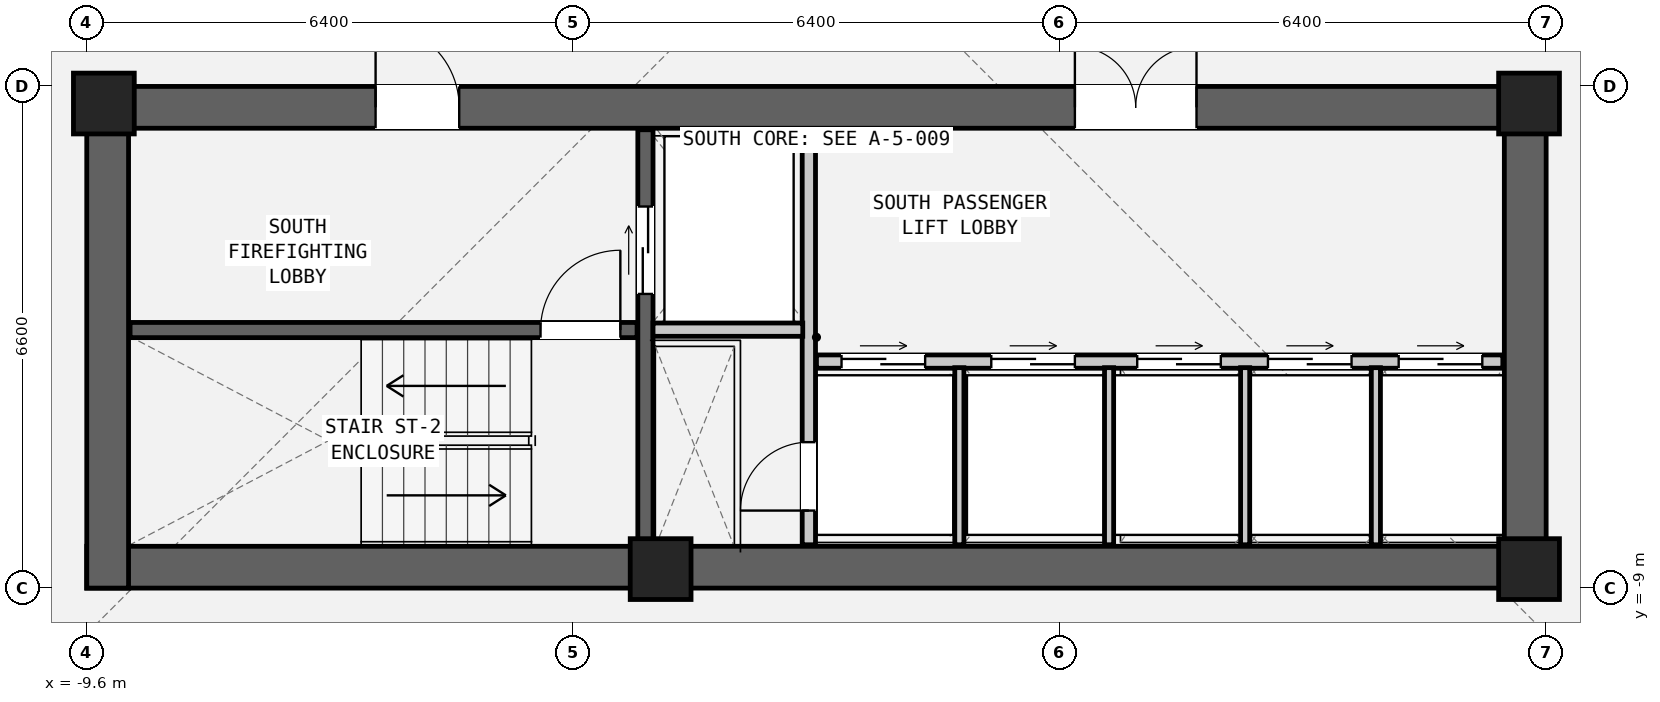
"""IFC4 building model, lengths in metres.
Left out: names, types, materials, properties, quantities, classifications, styles, units other than length and angle.
Written with IfcOpenShell. Run it as: python <this file> out.ifc"""

import sys

from ifc_helpers import new_model, si_unit, direction, frame, frame_2d, origin, origin_2d, place, context, subcontext, project, spatial, rectangle, extrude, element, fill, save


model = new_model("IFC4")
c1 = context("Model", 3, precision=1e-05, world=origin(), true_north=direction((0.0, 1.0)))
c2 = subcontext(c1, "Body", "Model", "MODEL_VIEW")
j1 = project(units=[si_unit("LENGTHUNIT", "METRE"), si_unit("PLANEANGLEUNIT", "RADIAN")], contexts=[c1])
p1 = place(None, origin())
s1 = spatial("IfcSite", under=j1, at=p1, CompositionType="ELEMENT")
p2 = place(p1, origin())
s2 = spatial("IfcBuilding", under=s1, at=p2, CompositionType="ELEMENT")
p3 = place(p2, frame((0.0, 0.0, 26.1)))
s3 = spatial("IfcBuildingStorey", under=s2, at=p3, CompositionType="ELEMENT", Elevation=26.1)
p4 = place(p3, frame((-9.6, -8.725, 0.0), z_axis=(0.0, 0.0, 1.0), x_axis=(1.0, 0.0, 0.0)))
e1 = element("IfcWall", 1, at=p4, inside=s3, PredefinedType="SHEAR", context=c2, shape_type="SweptSolid", body=[
    extrude(rectangle(XDim=19.2, YDim=0.55, at=frame_2d((9.6, 0.0))), origin(), (0.0, 0.0, 1.0), 3.05),
])
p5 = place(p3, frame((-9.6, -2.675, 0.0), z_axis=(0.0, 0.0, 1.0), x_axis=(1.0, 0.0, 0.0)))
e2 = element("IfcWall", 2, at=p5, inside=s3, PredefinedType="SHEAR", context=c2, shape_type="SweptSolid", body=[
    extrude(rectangle(XDim=19.2, YDim=0.55, at=frame_2d((9.6, 0.0))), origin(), (0.0, 0.0, 1.0), 3.05),
])
p6 = place(p5, frame((3.8, 0.0, 0.0)))
e3 = element("IfcOpeningElement", 3, at=p6, cuts=e2, PredefinedType="OPENING", context=c2, shape_type="SweptSolid", body=[
    extrude(rectangle(XDim=1.1, YDim=2.08, at=frame_2d((0.55, 1.04))), frame((0.0, 0.287, 0.0), z_axis=(0.0, -1.0, 0.0), x_axis=(1.0, 0.0, 0.0)), (0.0, 0.0, 1.0), 0.574),
])
p7 = place(p5, frame((13.0, 0.0, 0.0)))
e4 = element("IfcOpeningElement", 4, at=p7, cuts=e2, PredefinedType="OPENING", context=c2, shape_type="SweptSolid", body=[
    extrude(rectangle(XDim=1.6, YDim=2.12, at=frame_2d((0.8, 1.06))), frame((0.0, 0.287, 0.0), z_axis=(0.0, -1.0, 0.0), x_axis=(1.0, 0.0, 0.0)), (0.0, 0.0, 1.0), 0.574),
])
for number, where, z_axis, x_axis in (
    (5, (-9.325, -9.0, 0.0), (0.0, 0.0, 1.0), (0.0, 1.0, 0.0)),
    (6, (9.325, -9.0, 0.0), (0.0, 0.0, 1.0), (0.0, 1.0, 0.0)),
):
    element("IfcWall", number, at=place(p3, frame(where, z_axis=z_axis, x_axis=x_axis)), inside=s3, PredefinedType="SHEAR", context=c2, shape_type="SweptSolid", body=[
        extrude(rectangle(XDim=6.6, YDim=0.55, at=frame_2d((3.3, 0.0))), origin(), (0.0, 0.0, 1.0), 3.05),
    ])
for number, where, z_axis, x_axis in (
    (7, (-9.375, -2.625, 0.0), (0.0, 0.0, 1.0), (1.0, 0.0, 0.0)),
    (8, (9.375, -2.625, 0.0), (0.0, 0.0, 1.0), (1.0, 0.0, 0.0)),
    (9, (-2.05, -8.75, 0.0), (0.0, 0.0, 1.0), (1.0, 0.0, 0.0)),
    (10, (9.375, -8.75, 0.0), (0.0, 0.0, 1.0), (1.0, 0.0, 0.0)),
):
    element("IfcColumn", number, at=place(p3, frame(where, z_axis=z_axis, x_axis=x_axis)), inside=s3, PredefinedType="COLUMN", context=c2, shape_type="SweptSolid", body=[
        extrude(rectangle(XDim=0.8, YDim=0.8, at=origin_2d()), origin(), (0.0, 0.0, 1.0), 3.05),
    ])
p8 = place(p3, frame((-9.03, -5.605, 0.0), z_axis=(0.0, 0.0, 1.0), x_axis=(1.0, 0.0, 0.0)))
e11 = element("IfcWall", 11, at=p8, inside=s3, PredefinedType="SHEAR", context=c2, shape_type="SweptSolid", body=[
    extrude(rectangle(XDim=6.67, YDim=0.2, at=frame_2d((3.335, 0.0))), origin(), (0.0, 0.0, 1.0), 2.83),
])
p9 = place(p8, frame((5.4, 0.0, 0.0)))
e12 = element("IfcOpeningElement", 12, at=p9, cuts=e11, PredefinedType="OPENING", context=c2, shape_type="SweptSolid", body=[
    extrude(rectangle(XDim=1.05, YDim=2.08, at=frame_2d((0.525, 1.04))), frame((0.0, 0.112, 0.0), z_axis=(0.0, -1.0, 0.0), x_axis=(1.0, 0.0, 0.0)), (0.0, 0.0, 1.0), 0.224),
])
p10 = place(p3, frame((-2.25, -8.43, 0.0), z_axis=(0.0, 0.0, 1.0), x_axis=(0.0, 1.0, 0.0)))
e13 = element("IfcWall", 13, at=p10, inside=s3, PredefinedType="SHEAR", context=c2, shape_type="SweptSolid", body=[
    extrude(rectangle(XDim=5.46, YDim=0.2, at=frame_2d((2.73, 0.0))), origin(), (0.0, 0.0, 1.0), 2.83),
])
p11 = place(p10, frame((3.3, 0.0, 0.0)))
e14 = element("IfcOpeningElement", 14, at=p11, cuts=e13, PredefinedType="OPENING", context=c2, shape_type="SweptSolid", body=[
    extrude(rectangle(XDim=1.15, YDim=2.08, at=frame_2d((0.575, 1.04))), frame((0.0, 0.112, 0.0), z_axis=(0.0, -1.0, 0.0), x_axis=(1.0, 0.0, 0.0)), (0.0, 0.0, 1.0), 0.224),
])
p12 = place(p3, frame((-0.1, -8.43, 0.0), z_axis=(0.0, 0.0, 1.0), x_axis=(0.0, 1.0, 0.0)))
e15 = element("IfcWall", 15, at=p12, inside=s3, PredefinedType="PARTITIONING", context=c2, shape_type="SweptSolid", body=[
    extrude(rectangle(XDim=5.46, YDim=0.175, at=frame_2d((2.73, 0.0))), origin(), (0.0, 0.0, 1.0), 2.83),
])
p13 = place(p12, frame((0.45, 0.0, 0.0)))
e16 = element("IfcOpeningElement", 16, at=p13, cuts=e15, PredefinedType="OPENING", context=c2, shape_type="SweptSolid", body=[
    extrude(rectangle(XDim=0.9, YDim=2.05, at=frame_2d((0.45, 1.025))), frame((0.0, 0.1, 0.0), z_axis=(0.0, -1.0, 0.0), x_axis=(1.0, 0.0, 0.0)), (0.0, 0.0, 1.0), 0.199),
])
p14 = place(p3, frame((-2.15, -5.6, 0.0), z_axis=(0.0, 0.0, 1.0), x_axis=(1.0, 0.0, 0.0)))
e17 = element("IfcWall", 17, at=p14, inside=s3, PredefinedType="PARTITIONING", context=c2, shape_type="SweptSolid", body=[
    extrude(rectangle(XDim=1.97, YDim=0.175, at=frame_2d((0.985, 0.0))), origin(), (0.0, 0.0, 1.0), 2.83),
])
p15 = place(p3, frame((0.0, -6.02, 0.0), z_axis=(0.0, 0.0, 1.0), x_axis=(1.0, 0.0, 0.0)))
e18 = element("IfcWall", 18, at=p15, inside=s3, PredefinedType="PARTITIONING", context=c2, shape_type="SweptSolid", body=[
    extrude(rectangle(XDim=9.03, YDim=0.175, at=frame_2d((4.515, 0.0))), origin(), (0.0, 0.0, 1.0), 2.83),
])
p16 = place(p15, frame((0.33, 0.0, 0.0)))
e19 = element("IfcOpeningElement", 19, at=p16, cuts=e18, PredefinedType="OPENING", context=c2, shape_type="SweptSolid", body=[
    extrude(rectangle(XDim=1.1, YDim=2.06, at=frame_2d((0.55, 1.03))), frame((0.0, 0.1, 0.0), z_axis=(0.0, -1.0, 0.0), x_axis=(1.0, 0.0, 0.0)), (0.0, 0.0, 1.0), 0.199),
])
p17 = place(p15, frame((2.3, 0.0, 0.0)))
e20 = element("IfcOpeningElement", 20, at=p17, cuts=e18, PredefinedType="OPENING", context=c2, shape_type="SweptSolid", body=[
    extrude(rectangle(XDim=1.1, YDim=2.06, at=frame_2d((0.55, 1.03))), frame((0.0, 0.1, 0.0), z_axis=(0.0, -1.0, 0.0), x_axis=(1.0, 0.0, 0.0)), (0.0, 0.0, 1.0), 0.199),
])
p18 = place(p15, frame((4.22, 0.0, 0.0)))
e21 = element("IfcOpeningElement", 21, at=p18, cuts=e18, PredefinedType="OPENING", context=c2, shape_type="SweptSolid", body=[
    extrude(rectangle(XDim=1.1, YDim=2.06, at=frame_2d((0.55, 1.03))), frame((0.0, 0.1, 0.0), z_axis=(0.0, -1.0, 0.0), x_axis=(1.0, 0.0, 0.0)), (0.0, 0.0, 1.0), 0.199),
])
p19 = place(p15, frame((5.94, 0.0, 0.0)))
e22 = element("IfcOpeningElement", 22, at=p19, cuts=e18, PredefinedType="OPENING", context=c2, shape_type="SweptSolid", body=[
    extrude(rectangle(XDim=1.1, YDim=2.06, at=frame_2d((0.55, 1.03))), frame((0.0, 0.1, 0.0), z_axis=(0.0, -1.0, 0.0), x_axis=(1.0, 0.0, 0.0)), (0.0, 0.0, 1.0), 0.199),
])
p20 = place(p15, frame((7.66, 0.0, 0.0)))
e23 = element("IfcOpeningElement", 23, at=p20, cuts=e18, PredefinedType="OPENING", context=c2, shape_type="SweptSolid", body=[
    extrude(rectangle(XDim=1.1, YDim=2.06, at=frame_2d((0.55, 1.03))), frame((0.0, 0.1, 0.0), z_axis=(0.0, -1.0, 0.0), x_axis=(1.0, 0.0, 0.0)), (0.0, 0.0, 1.0), 0.199),
])
for number, where, z_axis, x_axis in (
    (24, (1.88, -8.43, 0.0), (0.0, 0.0, 1.0), (0.0, 1.0, 0.0)),
    (25, (3.85, -8.43, 0.0), (0.0, 0.0, 1.0), (0.0, 1.0, 0.0)),
    (26, (5.64, -8.43, 0.0), (0.0, 0.0, 1.0), (0.0, 1.0, 0.0)),
    (27, (7.36, -8.43, 0.0), (0.0, 0.0, 1.0), (0.0, 1.0, 0.0)),
):
    element("IfcWall", number, at=place(p3, frame(where, z_axis=z_axis, x_axis=x_axis)), inside=s3, PredefinedType="PARTITIONING", context=c2, shape_type="SweptSolid", body=[
        extrude(rectangle(XDim=2.33, YDim=0.12, at=frame_2d((1.165, 0.0))), origin(), (0.0, 0.0, 1.0), 2.83),
    ])
p21 = place(p9, origin())
e28 = element("IfcDoor", 28, at=p21, inside=s3, OperationType="SINGLE_SWING_RIGHT", PredefinedType="DOOR", context=c2, shape_type="SweptSolid", body=[
    extrude(rectangle(XDim=1.05, YDim=2.08, at=frame_2d((0.525, 1.04))), frame((0.0, 0.025, 0.0), z_axis=(0.0, -1.0, 0.0), x_axis=(1.0, 0.0, 0.0)), (0.0, 0.0, 1.0), 0.05),
])
fill(e12, e28)
p22 = place(p6, origin())
e29 = element("IfcDoor", 29, at=p22, inside=s3, OperationType="SINGLE_SWING_LEFT", PredefinedType="DOOR", context=c2, shape_type="SweptSolid", body=[
    extrude(rectangle(XDim=1.1, YDim=2.08, at=frame_2d((0.55, 1.04))), frame((0.0, 0.025, 0.0), z_axis=(0.0, -1.0, 0.0), x_axis=(1.0, 0.0, 0.0)), (0.0, 0.0, 1.0), 0.05),
])
fill(e3, e29)
p23 = place(p11, origin())
e30 = element("IfcDoor", 30, at=p23, inside=s3, OperationType="DOUBLE_DOOR_SLIDING", PredefinedType="DOOR", context=c2, shape_type="SweptSolid", body=[
    extrude(rectangle(XDim=1.15, YDim=2.08, at=frame_2d((0.575, 1.04))), frame((0.0, 0.025, 0.0), z_axis=(0.0, -1.0, 0.0), x_axis=(1.0, 0.0, 0.0)), (0.0, 0.0, 1.0), 0.05),
])
fill(e14, e30)
p24 = place(p13, origin())
e31 = element("IfcDoor", 31, at=p24, inside=s3, OperationType="SINGLE_SWING_LEFT", PredefinedType="DOOR", context=c2, shape_type="SweptSolid", body=[
    extrude(rectangle(XDim=0.9, YDim=2.05, at=frame_2d((0.45, 1.025))), frame((0.0, 0.025, 0.0), z_axis=(0.0, -1.0, 0.0), x_axis=(1.0, 0.0, 0.0)), (0.0, 0.0, 1.0), 0.05),
])
fill(e16, e31)
p25 = place(p7, origin())
e32 = element("IfcDoor", 32, at=p25, inside=s3, OperationType="DOUBLE_DOOR_SINGLE_SWING", PredefinedType="DOOR", context=c2, shape_type="SweptSolid", body=[
    extrude(rectangle(XDim=1.6, YDim=2.12, at=frame_2d((0.8, 1.06))), frame((0.0, 0.025, 0.0), z_axis=(0.0, -1.0, 0.0), x_axis=(1.0, 0.0, 0.0)), (0.0, 0.0, 1.0), 0.05),
])
fill(e4, e32)
p26 = place(p16, origin())
e33 = element("IfcDoor", 33, at=p26, inside=s3, OperationType="DOUBLE_DOOR_SLIDING", PredefinedType="DOOR", context=c2, shape_type="SweptSolid", body=[
    extrude(rectangle(XDim=1.1, YDim=2.06, at=frame_2d((0.55, 1.03))), frame((0.0, 0.025, 0.0), z_axis=(0.0, -1.0, 0.0), x_axis=(1.0, 0.0, 0.0)), (0.0, 0.0, 1.0), 0.05),
])
fill(e19, e33)
p27 = place(p17, origin())
e34 = element("IfcDoor", 34, at=p27, inside=s3, OperationType="DOUBLE_DOOR_SLIDING", PredefinedType="DOOR", context=c2, shape_type="SweptSolid", body=[
    extrude(rectangle(XDim=1.1, YDim=2.06, at=frame_2d((0.55, 1.03))), frame((0.0, 0.025, 0.0), z_axis=(0.0, -1.0, 0.0), x_axis=(1.0, 0.0, 0.0)), (0.0, 0.0, 1.0), 0.05),
])
fill(e20, e34)
p28 = place(p18, origin())
e35 = element("IfcDoor", 35, at=p28, inside=s3, OperationType="DOUBLE_DOOR_SLIDING", PredefinedType="DOOR", context=c2, shape_type="SweptSolid", body=[
    extrude(rectangle(XDim=1.1, YDim=2.06, at=frame_2d((0.55, 1.03))), frame((0.0, 0.025, 0.0), z_axis=(0.0, -1.0, 0.0), x_axis=(1.0, 0.0, 0.0)), (0.0, 0.0, 1.0), 0.05),
])
fill(e21, e35)
p29 = place(p19, origin())
e36 = element("IfcDoor", 36, at=p29, inside=s3, OperationType="DOUBLE_DOOR_SLIDING", PredefinedType="DOOR", context=c2, shape_type="SweptSolid", body=[
    extrude(rectangle(XDim=1.1, YDim=2.06, at=frame_2d((0.55, 1.03))), frame((0.0, 0.025, 0.0), z_axis=(0.0, -1.0, 0.0), x_axis=(1.0, 0.0, 0.0)), (0.0, 0.0, 1.0), 0.05),
])
fill(e22, e36)
p30 = place(p20, origin())
e37 = element("IfcDoor", 37, at=p30, inside=s3, OperationType="DOUBLE_DOOR_SLIDING", PredefinedType="DOOR", context=c2, shape_type="SweptSolid", body=[
    extrude(rectangle(XDim=1.1, YDim=2.06, at=frame_2d((0.55, 1.03))), frame((0.0, 0.025, 0.0), z_axis=(0.0, -1.0, 0.0), x_axis=(1.0, 0.0, 0.0)), (0.0, 0.0, 1.0), 0.05),
])
fill(e23, e37)
save(model, sys.argv[1])
